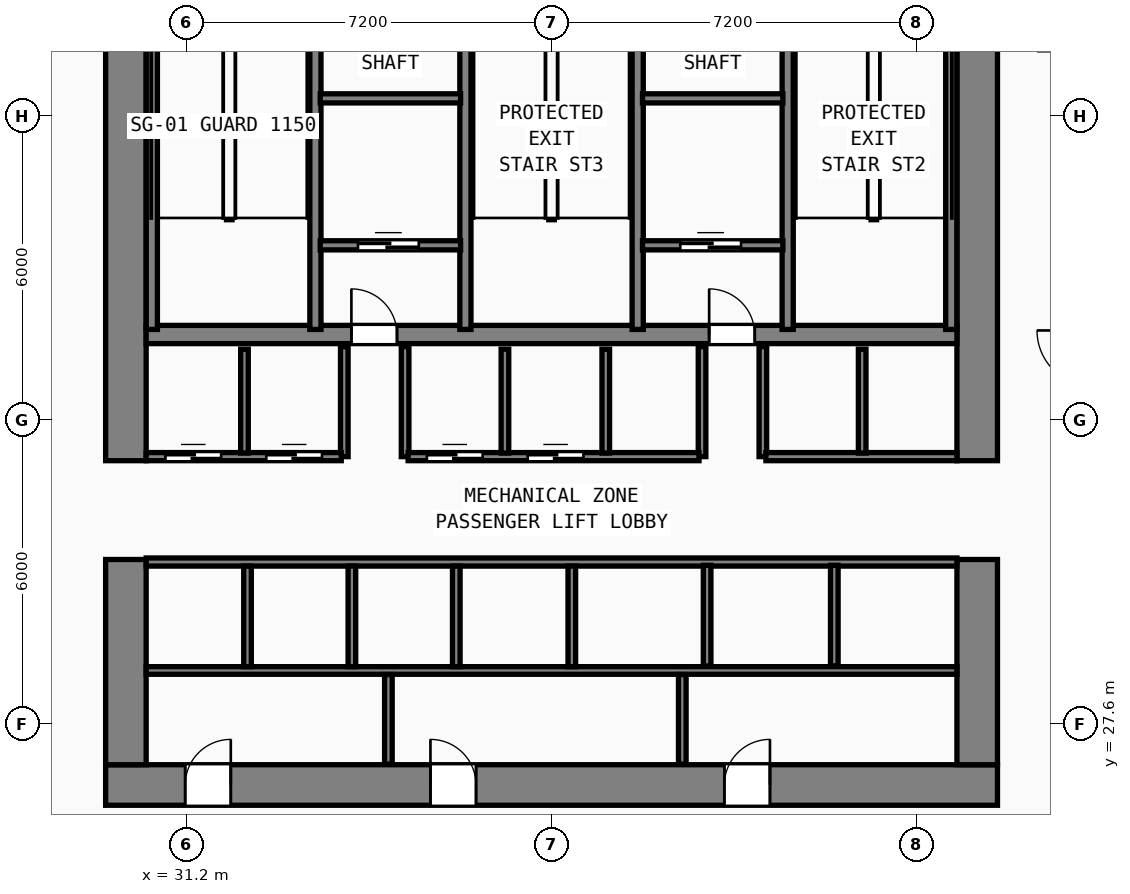
"""IFC4 building model, lengths in metres.
Left out: names, types, materials, properties, quantities, classifications, styles, units other than length and angle.
Written with IfcOpenShell. Run it as: python <this file> out.ifc"""

import sys

from ifc_helpers import new_model, si_unit, direction, frame, frame_2d, origin, place, context, subcontext, project, spatial, rectangle, extrude, element, fill, save


model = new_model("IFC4")
c1 = context("Model", 3, precision=1e-05, world=origin(), true_north=direction((0.0, 1.0)))
c2 = subcontext(c1, "Body", "Model", "MODEL_VIEW")
j1 = project(units=[si_unit("LENGTHUNIT", "METRE"), si_unit("PLANEANGLEUNIT", "RADIAN")], contexts=[c1])
p1 = place(None, origin())
s1 = spatial("IfcSite", under=j1, at=p1, CompositionType="ELEMENT")
p2 = place(p1, origin())
s2 = spatial("IfcBuilding", under=s1, at=p2, CompositionType="ELEMENT")
p3 = place(p2, frame((0.0, 0.0, 43.0)))
s3 = spatial("IfcBuildingStorey", under=s2, at=p3, CompositionType="ELEMENT", Elevation=43.0)
p4 = place(p3, frame((29.6, 26.4, 0.0), z_axis=(0.0, 0.0, 1.0), x_axis=(1.0, 0.0, 0.0)))
e1 = element("IfcWall", 1, at=p4, inside=s3, PredefinedType="SHEAR", context=c2, shape_type="SweptSolid", body=[
    extrude(rectangle(XDim=17.6, YDim=0.8, at=frame_2d((8.8, 0.0))), origin(), (0.0, 0.0, 1.0), 4.4),
])
p5 = place(p4, frame((2.47, 0.0, 0.0), z_axis=(0.0, 0.0, 1.0), x_axis=(-1.0, 0.0, 0.0)))
e2 = element("IfcOpeningElement", 2, at=p5, cuts=e1, PredefinedType="OPENING", context=c2, shape_type="SweptSolid", body=[
    extrude(rectangle(XDim=0.9, YDim=2.1, at=frame_2d((0.45, 1.05))), frame((0.0, 0.41, 0.0), z_axis=(0.0, -1.0, 0.0), x_axis=(1.0, 0.0, 0.0)), (0.0, 0.0, 1.0), 0.82),
])
p6 = place(p4, frame((7.31, 0.0, 0.0), z_axis=(0.0, 0.0, 1.0), x_axis=(-1.0, 0.0, 0.0)))
e3 = element("IfcOpeningElement", 3, at=p6, cuts=e1, PredefinedType="OPENING", context=c2, shape_type="SweptSolid", body=[
    extrude(rectangle(XDim=0.9, YDim=2.1, at=frame_2d((0.45, 1.05))), frame((0.0, 0.41, 0.0), z_axis=(0.0, -1.0, 0.0), x_axis=(1.0, 0.0, 0.0)), (0.0, 0.0, 1.0), 0.82),
])
p7 = place(p4, frame((13.11, 0.0, 0.0), z_axis=(0.0, 0.0, 1.0), x_axis=(-1.0, 0.0, 0.0)))
e4 = element("IfcOpeningElement", 4, at=p7, cuts=e1, PredefinedType="OPENING", context=c2, shape_type="SweptSolid", body=[
    extrude(rectangle(XDim=0.9, YDim=2.1, at=frame_2d((0.45, 1.05))), frame((0.0, 0.41, 0.0), z_axis=(0.0, -1.0, 0.0), x_axis=(1.0, 0.0, 0.0)), (0.0, 0.0, 1.0), 0.82),
])
p8 = place(p3, frame((30.0, 26.8, 0.0), z_axis=(0.0, 0.0, 1.0), x_axis=(0.0, 1.0, 0.0)))
e5 = element("IfcWall", 5, at=p8, inside=s3, PredefinedType="SHEAR", context=c2, shape_type="SweptSolid", body=[
    extrude(rectangle(XDim=4.05, YDim=0.8, at=frame_2d((2.025, 0.0))), origin(), (0.0, 0.0, 1.0), 4.4),
])
p9 = place(p3, frame((30.0, 32.8, 0.0), z_axis=(0.0, 0.0, 1.0), x_axis=(0.0, 1.0, 0.0)))
e6 = element("IfcWall", 6, at=p9, inside=s3, PredefinedType="SHEAR", context=c2, shape_type="SweptSolid", body=[
    extrude(rectangle(XDim=10.0, YDim=0.8, at=frame_2d((5.0, 0.0))), origin(), (0.0, 0.0, 1.0), 4.4),
])
p10 = place(p3, frame((46.8, 26.8, 0.0), z_axis=(0.0, 0.0, 1.0), x_axis=(0.0, 1.0, 0.0)))
e7 = element("IfcWall", 7, at=p10, inside=s3, PredefinedType="SHEAR", context=c2, shape_type="SweptSolid", body=[
    extrude(rectangle(XDim=4.05, YDim=0.8, at=frame_2d((2.025, 0.0))), origin(), (0.0, 0.0, 1.0), 4.4),
])
p11 = place(p3, frame((46.8, 32.8, 0.0), z_axis=(0.0, 0.0, 1.0), x_axis=(0.0, 1.0, 0.0)))
e8 = element("IfcWall", 8, at=p11, inside=s3, PredefinedType="SHEAR", context=c2, shape_type="SweptSolid", body=[
    extrude(rectangle(XDim=10.0, YDim=0.8, at=frame_2d((5.0, 0.0))), origin(), (0.0, 0.0, 1.0), 4.4),
])
p12 = place(p3, frame((30.4, 35.29, 0.0), z_axis=(0.0, 0.0, 1.0), x_axis=(1.0, 0.0, 0.0)))
e9 = element("IfcWall", 9, at=p12, inside=s3, PredefinedType="SHEAR", context=c2, shape_type="SweptSolid", body=[
    extrude(rectangle(XDim=16.0, YDim=0.36, at=frame_2d((8.0, 0.0))), origin(), (0.0, 0.0, 1.0), 4.4),
])
p13 = place(p12, frame((4.95, 0.0, 0.0), z_axis=(0.0, 0.0, 1.0), x_axis=(-1.0, 0.0, 0.0)))
e10 = element("IfcOpeningElement", 10, at=p13, cuts=e9, PredefinedType="OPENING", context=c2, shape_type="SweptSolid", body=[
    extrude(rectangle(XDim=0.9, YDim=2.1, at=frame_2d((0.45, 1.05))), frame((0.0, 0.19, 0.0), z_axis=(0.0, -1.0, 0.0), x_axis=(1.0, 0.0, 0.0)), (0.0, 0.0, 1.0), 0.38),
])
p14 = place(p12, frame((12.01, 0.0, 0.0), z_axis=(0.0, 0.0, 1.0), x_axis=(-1.0, 0.0, 0.0)))
e11 = element("IfcOpeningElement", 11, at=p14, cuts=e9, PredefinedType="OPENING", context=c2, shape_type="SweptSolid", body=[
    extrude(rectangle(XDim=0.9, YDim=2.1, at=frame_2d((0.45, 1.05))), frame((0.0, 0.19, 0.0), z_axis=(0.0, -1.0, 0.0), x_axis=(1.0, 0.0, 0.0)), (0.0, 0.0, 1.0), 0.38),
])
for number, where, z_axis, x_axis in (
    (12, (30.512, 35.39, 0.0), (0.0, 0.0, 1.0), (0.0, 1.0, 0.0)),
    (13, (33.74, 35.39, 0.0), (0.0, 0.0, 1.0), (0.0, 1.0, 0.0)),
    (14, (36.7, 35.39, 0.0), (0.0, 0.0, 1.0), (0.0, 1.0, 0.0)),
    (15, (40.1, 35.39, 0.0), (0.0, 0.0, 1.0), (0.0, 1.0, 0.0)),
    (16, (43.06, 35.39, 0.0), (0.0, 0.0, 1.0), (0.0, 1.0, 0.0)),
    (17, (46.288, 35.39, 0.0), (0.0, 0.0, 1.0), (0.0, 1.0, 0.0)),
):
    element("IfcWall", number, at=place(p3, frame(where, z_axis=z_axis, x_axis=x_axis)), inside=s3, PredefinedType="SHEAR", context=c2, shape_type="SweptSolid", body=[
        extrude(rectangle(XDim=7.41, YDim=0.22, at=frame_2d((3.705, 0.0))), origin(), (0.0, 0.0, 1.0), 4.4),
    ])
for number, where, z_axis, x_axis in (
    (18, (33.835, 39.95, 0.0), (0.0, 0.0, 1.0), (1.0, 0.0, 0.0)),
    (19, (40.195, 39.95, 0.0), (0.0, 0.0, 1.0), (1.0, 0.0, 0.0)),
):
    element("IfcWall", number, at=place(p3, frame(where, z_axis=z_axis, x_axis=x_axis)), inside=s3, PredefinedType="SOLIDWALL", context=c2, shape_type="SweptSolid", body=[
        extrude(rectangle(XDim=2.77, YDim=0.18, at=frame_2d((1.385, 0.0))), origin(), (0.0, 0.0, 1.0), 4.4),
    ])
p15 = place(p3, frame((33.835, 37.05, 0.0), z_axis=(0.0, 0.0, 1.0), x_axis=(1.0, 0.0, 0.0)))
e20 = element("IfcWall", 20, at=p15, inside=s3, PredefinedType="SOLIDWALL", context=c2, shape_type="SweptSolid", body=[
    extrude(rectangle(XDim=2.77, YDim=0.18, at=frame_2d((1.385, 0.0))), origin(), (0.0, 0.0, 1.0), 4.4),
])
p16 = place(p15, frame((1.945, 0.0, 0.0), z_axis=(0.0, 0.0, 1.0), x_axis=(-1.0, 0.0, 0.0)))
e21 = element("IfcOpeningElement", 21, at=p16, cuts=e20, PredefinedType="OPENING", context=c2, shape_type="SweptSolid", body=[
    extrude(rectangle(XDim=1.2, YDim=2.2, at=frame_2d((0.6, 1.1))), frame((0.0, 0.1, 0.0), z_axis=(0.0, -1.0, 0.0), x_axis=(1.0, 0.0, 0.0)), (0.0, 0.0, 1.0), 0.2),
])
for number, where, z_axis, x_axis in (
    (22, (34.31, 32.88, 0.0), (0.0, 0.0, 1.0), (0.0, 1.0, 0.0)),
    (23, (35.51, 32.88, 0.0), (0.0, 0.0, 1.0), (0.0, 1.0, 0.0)),
):
    element("IfcWall", number, at=place(p3, frame(where, z_axis=z_axis, x_axis=x_axis)), inside=s3, PredefinedType="SOLIDWALL", context=c2, shape_type="SweptSolid", body=[
        extrude(rectangle(XDim=2.17, YDim=0.15, at=frame_2d((1.085, 0.0))), origin(), (0.0, 0.0, 1.0), 4.4),
    ])
p17 = place(p3, frame((40.195, 37.05, 0.0), z_axis=(0.0, 0.0, 1.0), x_axis=(1.0, 0.0, 0.0)))
e24 = element("IfcWall", 24, at=p17, inside=s3, PredefinedType="SOLIDWALL", context=c2, shape_type="SweptSolid", body=[
    extrude(rectangle(XDim=2.77, YDim=0.18, at=frame_2d((1.385, 0.0))), origin(), (0.0, 0.0, 1.0), 4.4),
])
p18 = place(p17, frame((1.945, 0.0, 0.0), z_axis=(0.0, 0.0, 1.0), x_axis=(-1.0, 0.0, 0.0)))
e25 = element("IfcOpeningElement", 25, at=p18, cuts=e24, PredefinedType="OPENING", context=c2, shape_type="SweptSolid", body=[
    extrude(rectangle(XDim=1.2, YDim=2.2, at=frame_2d((0.6, 1.1))), frame((0.0, 0.1, 0.0), z_axis=(0.0, -1.0, 0.0), x_axis=(1.0, 0.0, 0.0)), (0.0, 0.0, 1.0), 0.2),
])
for number, where, z_axis, x_axis in (
    (26, (41.37, 32.88, 0.0), (0.0, 0.0, 1.0), (0.0, 1.0, 0.0)),
    (27, (42.57, 32.88, 0.0), (0.0, 0.0, 1.0), (0.0, 1.0, 0.0)),
):
    element("IfcWall", number, at=place(p3, frame(where, z_axis=z_axis, x_axis=x_axis)), inside=s3, PredefinedType="SOLIDWALL", context=c2, shape_type="SweptSolid", body=[
        extrude(rectangle(XDim=2.17, YDim=0.15, at=frame_2d((1.085, 0.0))), origin(), (0.0, 0.0, 1.0), 4.4),
    ])
p19 = place(p3, frame((30.4, 32.88, 0.0), z_axis=(0.0, 0.0, 1.0), x_axis=(1.0, 0.0, 0.0)))
e28 = element("IfcWall", 28, at=p19, inside=s3, PredefinedType="SOLIDWALL", context=c2, shape_type="SweptSolid", body=[
    extrude(rectangle(XDim=3.85, YDim=0.16, at=frame_2d((1.925, 0.0))), origin(), (0.0, 0.0, 1.0), 4.4),
])
p20 = place(p19, frame((1.48, 0.0, 0.0), z_axis=(0.0, 0.0, 1.0), x_axis=(-1.0, 0.0, 0.0)))
e29 = element("IfcOpeningElement", 29, at=p20, cuts=e28, PredefinedType="OPENING", context=c2, shape_type="SweptSolid", body=[
    extrude(rectangle(XDim=1.1, YDim=2.2, at=frame_2d((0.55, 1.1))), frame((0.0, 0.09, 0.0), z_axis=(0.0, -1.0, 0.0), x_axis=(1.0, 0.0, 0.0)), (0.0, 0.0, 1.0), 0.18),
])
p21 = place(p19, frame((3.47, 0.0, 0.0), z_axis=(0.0, 0.0, 1.0), x_axis=(-1.0, 0.0, 0.0)))
e30 = element("IfcOpeningElement", 30, at=p21, cuts=e28, PredefinedType="OPENING", context=c2, shape_type="SweptSolid", body=[
    extrude(rectangle(XDim=1.1, YDim=2.2, at=frame_2d((0.55, 1.1))), frame((0.0, 0.09, 0.0), z_axis=(0.0, -1.0, 0.0), x_axis=(1.0, 0.0, 0.0)), (0.0, 0.0, 1.0), 0.18),
])
p22 = place(p3, frame((35.57, 32.88, 0.0), z_axis=(0.0, 0.0, 1.0), x_axis=(1.0, 0.0, 0.0)))
e31 = element("IfcWall", 31, at=p22, inside=s3, PredefinedType="SOLIDWALL", context=c2, shape_type="SweptSolid", body=[
    extrude(rectangle(XDim=5.74, YDim=0.16, at=frame_2d((2.87, 0.0))), origin(), (0.0, 0.0, 1.0), 4.4),
])
p23 = place(p22, frame((1.47, 0.0, 0.0), z_axis=(0.0, 0.0, 1.0), x_axis=(-1.0, 0.0, 0.0)))
e32 = element("IfcOpeningElement", 32, at=p23, cuts=e31, PredefinedType="OPENING", context=c2, shape_type="SweptSolid", body=[
    extrude(rectangle(XDim=1.1, YDim=2.2, at=frame_2d((0.55, 1.1))), frame((0.0, 0.09, 0.0), z_axis=(0.0, -1.0, 0.0), x_axis=(1.0, 0.0, 0.0)), (0.0, 0.0, 1.0), 0.18),
])
p24 = place(p22, frame((3.46, 0.0, 0.0), z_axis=(0.0, 0.0, 1.0), x_axis=(-1.0, 0.0, 0.0)))
e33 = element("IfcOpeningElement", 33, at=p24, cuts=e31, PredefinedType="OPENING", context=c2, shape_type="SweptSolid", body=[
    extrude(rectangle(XDim=1.1, YDim=2.2, at=frame_2d((0.55, 1.1))), frame((0.0, 0.09, 0.0), z_axis=(0.0, -1.0, 0.0), x_axis=(1.0, 0.0, 0.0)), (0.0, 0.0, 1.0), 0.18),
])
p25 = place(p3, frame((42.63, 32.88, 0.0), z_axis=(0.0, 0.0, 1.0), x_axis=(1.0, 0.0, 0.0)))
e34 = element("IfcWall", 34, at=p25, inside=s3, PredefinedType="SOLIDWALL", context=c2, shape_type="SweptSolid", body=[
    extrude(rectangle(XDim=3.77, YDim=0.16, at=frame_2d((1.885, 0.0))), origin(), (0.0, 0.0, 1.0), 4.4),
])
for number, where, z_axis, x_axis in (
    (35, (32.34, 32.95, 0.0), (0.0, 0.0, 1.0), (0.0, 1.0, 0.0)),
    (36, (37.48, 32.95, 0.0), (0.0, 0.0, 1.0), (0.0, 1.0, 0.0)),
    (37, (39.47, 32.95, 0.0), (0.0, 0.0, 1.0), (0.0, 1.0, 0.0)),
    (38, (44.53, 32.95, 0.0), (0.0, 0.0, 1.0), (0.0, 1.0, 0.0)),
):
    element("IfcWall", number, at=place(p3, frame(where, z_axis=z_axis, x_axis=x_axis)), inside=s3, PredefinedType="SOLIDWALL", context=c2, shape_type="SweptSolid", body=[
        extrude(rectangle(XDim=2.05, YDim=0.15, at=frame_2d((1.025, 0.0))), origin(), (0.0, 0.0, 1.0), 4.4),
    ])
p26 = place(p3, frame((30.4, 30.8, 0.0), z_axis=(0.0, 0.0, 1.0), x_axis=(1.0, 0.0, 0.0)))
e39 = element("IfcWall", 39, at=p26, inside=s3, PredefinedType="SOLIDWALL", context=c2, shape_type="SweptSolid", body=[
    extrude(rectangle(XDim=16.0, YDim=0.16, at=frame_2d((8.0, 0.0))), origin(), (0.0, 0.0, 1.0), 4.4),
])
p27 = place(p3, frame((30.4, 28.66, 0.0), z_axis=(0.0, 0.0, 1.0), x_axis=(1.0, 0.0, 0.0)))
e40 = element("IfcWall", 40, at=p27, inside=s3, PredefinedType="PARTITIONING", context=c2, shape_type="SweptSolid", body=[
    extrude(rectangle(XDim=16.0, YDim=0.15, at=frame_2d((8.0, 0.0))), origin(), (0.0, 0.0, 1.0), 4.4),
])
for number, where, z_axis, x_axis in (
    (41, (32.4, 28.735, 0.0), (0.0, 0.0, 1.0), (0.0, 1.0, 0.0)),
    (42, (34.46, 28.735, 0.0), (0.0, 0.0, 1.0), (0.0, 1.0, 0.0)),
    (43, (36.52, 28.735, 0.0), (0.0, 0.0, 1.0), (0.0, 1.0, 0.0)),
    (44, (38.8, 28.735, 0.0), (0.0, 0.0, 1.0), (0.0, 1.0, 0.0)),
):
    element("IfcWall", number, at=place(p3, frame(where, z_axis=z_axis, x_axis=x_axis)), inside=s3, PredefinedType="SOLIDWALL", context=c2, shape_type="SweptSolid", body=[
        extrude(rectangle(XDim=1.985, YDim=0.15, at=frame_2d((0.992, 0.0))), origin(), (0.0, 0.0, 1.0), 4.4),
    ])
for number, where, z_axis, x_axis in (
    (45, (35.18, 26.81, 0.0), (0.0, 0.0, 1.0), (0.0, 1.0, 0.0)),
    (46, (40.98, 26.81, 0.0), (0.0, 0.0, 1.0), (0.0, 1.0, 0.0)),
):
    element("IfcWall", number, at=place(p3, frame(where, z_axis=z_axis, x_axis=x_axis)), inside=s3, PredefinedType="PARTITIONING", context=c2, shape_type="SweptSolid", body=[
        extrude(rectangle(XDim=1.77, YDim=0.15, at=frame_2d((0.885, 0.0))), origin(), (0.0, 0.0, 1.0), 4.4),
    ])
for number, where, z_axis, x_axis in (
    (47, (41.47, 28.75, 0.0), (0.0, 0.0, 1.0), (0.0, 1.0, 0.0)),
    (48, (43.98, 28.75, 0.0), (0.0, 0.0, 1.0), (0.0, 1.0, 0.0)),
):
    element("IfcWall", number, at=place(p3, frame(where, z_axis=z_axis, x_axis=x_axis)), inside=s3, PredefinedType="SOLIDWALL", context=c2, shape_type="SweptSolid", body=[
        extrude(rectangle(XDim=1.985, YDim=0.15, at=frame_2d((0.993, 0.0))), origin(), (0.0, 0.0, 1.0), 4.4),
    ])
p28 = place(p16, origin())
e49 = element("IfcDoor", 49, at=p28, inside=s3, OperationType="SLIDING_TO_RIGHT", PredefinedType="DOOR", context=c2, shape_type="SweptSolid", body=[
    extrude(rectangle(XDim=1.2, YDim=2.2, at=frame_2d((0.6, 1.1))), frame((0.0, 0.025, 0.0), z_axis=(0.0, -1.0, 0.0), x_axis=(1.0, 0.0, 0.0)), (0.0, 0.0, 1.0), 0.05),
])
fill(e21, e49)
p29 = place(p13, origin())
e50 = element("IfcDoor", 50, at=p29, inside=s3, OperationType="SINGLE_SWING_RIGHT", PredefinedType="DOOR", context=c2, shape_type="SweptSolid", body=[
    extrude(rectangle(XDim=0.9, YDim=2.1, at=frame_2d((0.45, 1.05))), frame((0.0, 0.025, 0.0), z_axis=(0.0, -1.0, 0.0), x_axis=(1.0, 0.0, 0.0)), (0.0, 0.0, 1.0), 0.05),
])
fill(e10, e50)
p30 = place(p18, origin())
e51 = element("IfcDoor", 51, at=p30, inside=s3, OperationType="SLIDING_TO_RIGHT", PredefinedType="DOOR", context=c2, shape_type="SweptSolid", body=[
    extrude(rectangle(XDim=1.2, YDim=2.2, at=frame_2d((0.6, 1.1))), frame((0.0, 0.025, 0.0), z_axis=(0.0, -1.0, 0.0), x_axis=(1.0, 0.0, 0.0)), (0.0, 0.0, 1.0), 0.05),
])
fill(e25, e51)
p31 = place(p14, origin())
e52 = element("IfcDoor", 52, at=p31, inside=s3, OperationType="SINGLE_SWING_RIGHT", PredefinedType="DOOR", context=c2, shape_type="SweptSolid", body=[
    extrude(rectangle(XDim=0.9, YDim=2.1, at=frame_2d((0.45, 1.05))), frame((0.0, 0.025, 0.0), z_axis=(0.0, -1.0, 0.0), x_axis=(1.0, 0.0, 0.0)), (0.0, 0.0, 1.0), 0.05),
])
fill(e11, e52)
p32 = place(p20, origin())
e53 = element("IfcDoor", 53, at=p32, inside=s3, OperationType="SLIDING_TO_LEFT", PredefinedType="DOOR", context=c2, shape_type="SweptSolid", body=[
    extrude(rectangle(XDim=1.1, YDim=2.2, at=frame_2d((0.55, 1.1))), frame((0.0, 0.025, 0.0), z_axis=(0.0, -1.0, 0.0), x_axis=(1.0, 0.0, 0.0)), (0.0, 0.0, 1.0), 0.05),
])
fill(e29, e53)
p33 = place(p21, origin())
e54 = element("IfcDoor", 54, at=p33, inside=s3, OperationType="SLIDING_TO_LEFT", PredefinedType="DOOR", context=c2, shape_type="SweptSolid", body=[
    extrude(rectangle(XDim=1.1, YDim=2.2, at=frame_2d((0.55, 1.1))), frame((0.0, 0.025, 0.0), z_axis=(0.0, -1.0, 0.0), x_axis=(1.0, 0.0, 0.0)), (0.0, 0.0, 1.0), 0.05),
])
fill(e30, e54)
p34 = place(p23, origin())
e55 = element("IfcDoor", 55, at=p34, inside=s3, OperationType="SLIDING_TO_LEFT", PredefinedType="DOOR", context=c2, shape_type="SweptSolid", body=[
    extrude(rectangle(XDim=1.1, YDim=2.2, at=frame_2d((0.55, 1.1))), frame((0.0, 0.025, 0.0), z_axis=(0.0, -1.0, 0.0), x_axis=(1.0, 0.0, 0.0)), (0.0, 0.0, 1.0), 0.05),
])
fill(e32, e55)
p35 = place(p24, origin())
e56 = element("IfcDoor", 56, at=p35, inside=s3, OperationType="SLIDING_TO_LEFT", PredefinedType="DOOR", context=c2, shape_type="SweptSolid", body=[
    extrude(rectangle(XDim=1.1, YDim=2.2, at=frame_2d((0.55, 1.1))), frame((0.0, 0.025, 0.0), z_axis=(0.0, -1.0, 0.0), x_axis=(1.0, 0.0, 0.0)), (0.0, 0.0, 1.0), 0.05),
])
fill(e33, e56)
p36 = place(p5, origin())
e57 = element("IfcDoor", 57, at=p36, inside=s3, OperationType="SINGLE_SWING_LEFT", PredefinedType="DOOR", context=c2, shape_type="SweptSolid", body=[
    extrude(rectangle(XDim=0.9, YDim=2.1, at=frame_2d((0.45, 1.05))), frame((0.0, -0.195, 0.0), z_axis=(0.0, -1.0, 0.0), x_axis=(1.0, 0.0, 0.0)), (0.0, 0.0, 1.0), 0.05),
])
fill(e2, e57)
p37 = place(p6, origin())
e58 = element("IfcDoor", 58, at=p37, inside=s3, OperationType="SINGLE_SWING_RIGHT", PredefinedType="DOOR", context=c2, shape_type="SweptSolid", body=[
    extrude(rectangle(XDim=0.9, YDim=2.1, at=frame_2d((0.45, 1.05))), frame((0.0, -0.195, 0.0), z_axis=(0.0, -1.0, 0.0), x_axis=(1.0, 0.0, 0.0)), (0.0, 0.0, 1.0), 0.05),
])
fill(e3, e58)
p38 = place(p7, origin())
e59 = element("IfcDoor", 59, at=p38, inside=s3, OperationType="SINGLE_SWING_LEFT", PredefinedType="DOOR", context=c2, shape_type="SweptSolid", body=[
    extrude(rectangle(XDim=0.9, YDim=2.1, at=frame_2d((0.45, 1.05))), frame((0.0, -0.195, 0.0), z_axis=(0.0, -1.0, 0.0), x_axis=(1.0, 0.0, 0.0)), (0.0, 0.0, 1.0), 0.05),
])
fill(e4, e59)
save(model, sys.argv[1])
